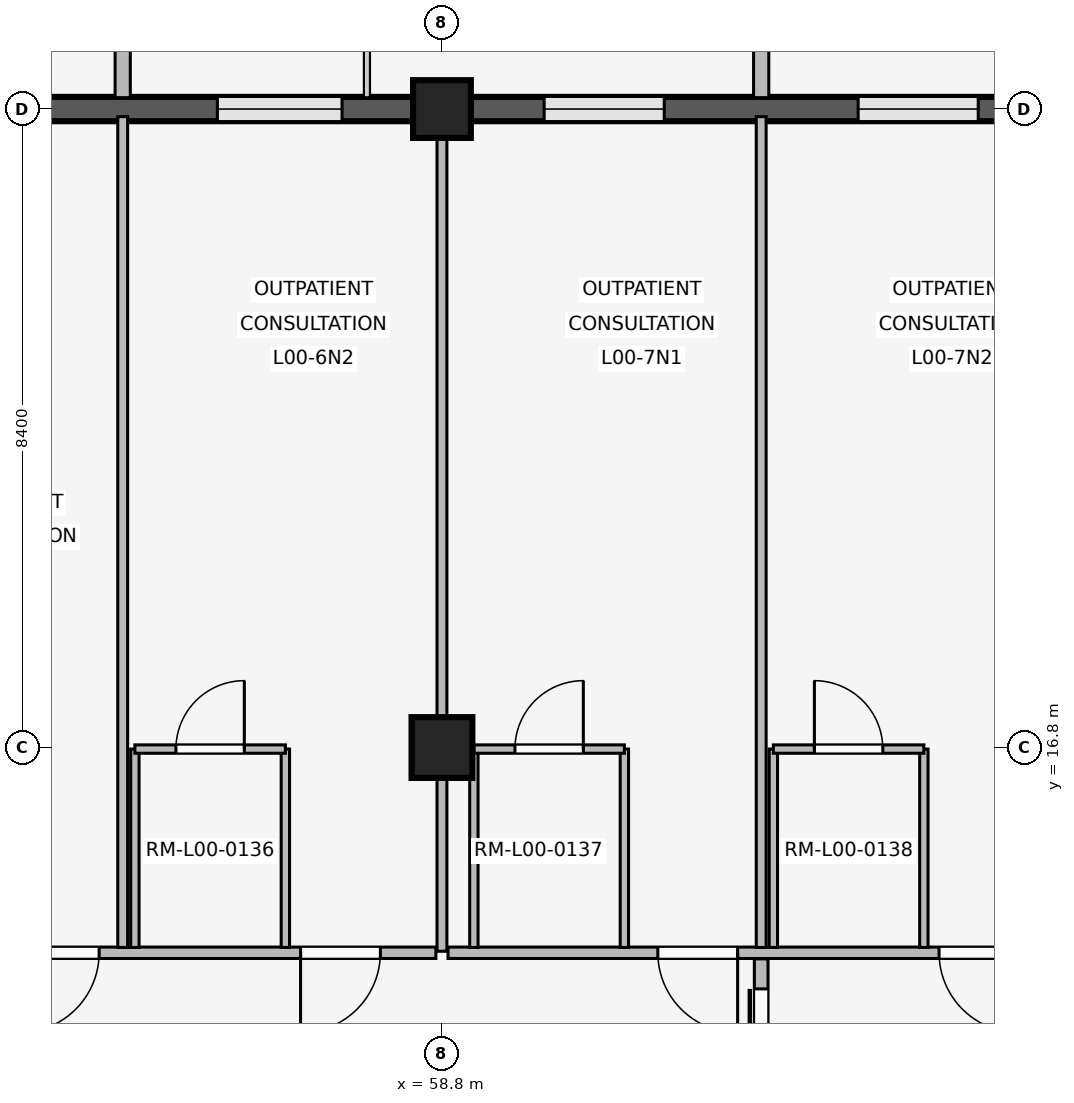
"""IFC4 building model, lengths in metres.
Left out: names, types, materials, properties, quantities, classifications, styles, units other than length and angle.
Written with IfcOpenShell. Run it as: python <this file> out.ifc"""

import sys

from ifc_helpers import new_model, si_unit, direction, frame, frame_2d, origin, origin_2d, place, context, subcontext, project, spatial, rectangle, extrude, element, fill, save


model = new_model("IFC4")
c1 = context("Model", 3, precision=1e-05, world=origin(), true_north=direction((0.0, 1.0)))
c2 = subcontext(c1, "Body", "Model", "MODEL_VIEW")
j1 = project(units=[si_unit("LENGTHUNIT", "METRE"), si_unit("PLANEANGLEUNIT", "RADIAN")], contexts=[c1])
p1 = place(None, origin())
s1 = spatial("IfcSite", under=j1, at=p1, CompositionType="ELEMENT")
p2 = place(p1, origin())
s2 = spatial("IfcBuilding", under=s1, at=p2, CompositionType="ELEMENT")
p3 = place(p2, origin())
s3 = spatial("IfcBuildingStorey", under=s2, at=p3, CompositionType="ELEMENT", Elevation=0.0)
p4 = place(p3, frame((58.8, 16.8, 0.0), z_axis=(0.0, 0.0, 1.0), x_axis=(1.0, 0.0, 0.0)))
e1 = element("IfcColumn", 1, at=p4, inside=s3, PredefinedType="COLUMN", context=c2, shape_type="SweptSolid", body=[
    extrude(rectangle(XDim=0.8, YDim=0.8, at=origin_2d()), origin(), (0.0, 0.0, 1.0), 4.8),
])
p5 = place(p3, frame((58.8, 25.2, 0.0), z_axis=(0.0, 0.0, 1.0), x_axis=(1.0, 0.0, 0.0)))
e2 = element("IfcColumn", 2, at=p5, inside=s3, PredefinedType="COLUMN", context=c2, shape_type="SweptSolid", body=[
    extrude(rectangle(XDim=0.76, YDim=0.76, at=origin_2d()), origin(), (0.0, 0.0, 1.0), 4.8),
])
p6 = place(p3, frame((50.775, 25.2, 0.0), z_axis=(0.0, 0.0, 1.0), x_axis=(1.0, 0.0, 0.0)))
e3 = element("IfcWall", 3, at=p6, inside=s3, PredefinedType="SOLIDWALL", context=c2, shape_type="SweptSolid", body=[
    extrude(rectangle(XDim=7.65, YDim=0.32, at=frame_2d((3.825, 0.0))), origin(), (0.0, 0.0, 1.0), 3.82),
])
p7 = place(p6, frame((0.939, 0.0, 0.85)))
e4 = element("IfcOpeningElement", 4, at=p7, cuts=e3, PredefinedType="OPENING", context=c2, shape_type="SweptSolid", body=[
    extrude(rectangle(XDim=1.64, YDim=1.75, at=frame_2d((0.82, 0.875))), frame((0.0, 0.17, 0.0), z_axis=(0.0, -1.0, 0.0), x_axis=(1.0, 0.0, 0.0)), (0.0, 0.0, 1.0), 0.34),
])
p8 = place(p6, frame((5.071, 0.0, 0.85)))
e5 = element("IfcOpeningElement", 5, at=p8, cuts=e3, PredefinedType="OPENING", context=c2, shape_type="SweptSolid", body=[
    extrude(rectangle(XDim=1.64, YDim=1.75, at=frame_2d((0.82, 0.875))), frame((0.0, 0.17, 0.0), z_axis=(0.0, -1.0, 0.0), x_axis=(1.0, 0.0, 0.0)), (0.0, 0.0, 1.0), 0.34),
])
p9 = place(p3, frame((54.6, 25.35, 0.0), z_axis=(0.0, 0.0, 1.0), x_axis=(0.0, 1.0, 0.0)))
e6 = element("IfcWall", 6, at=p9, inside=s3, PredefinedType="ELEMENTEDWALL", context=c2, shape_type="SweptSolid", body=[
    extrude(rectangle(XDim=0.85, YDim=0.2, at=frame_2d((0.425, 0.0))), origin(), (0.0, 0.0, 1.0), 3.8),
])
p10 = place(p3, frame((59.175, 25.2, 0.0), z_axis=(0.0, 0.0, 1.0), x_axis=(1.0, 0.0, 0.0)))
e7 = element("IfcWall", 7, at=p10, inside=s3, PredefinedType="SOLIDWALL", context=c2, shape_type="SweptSolid", body=[
    extrude(rectangle(XDim=7.65, YDim=0.32, at=frame_2d((3.825, 0.0))), origin(), (0.0, 0.0, 1.0), 3.82),
])
p11 = place(p10, frame((0.969, 0.0, 0.85)))
e8 = element("IfcOpeningElement", 8, at=p11, cuts=e7, PredefinedType="OPENING", context=c2, shape_type="SweptSolid", body=[
    extrude(rectangle(XDim=1.58, YDim=1.7, at=frame_2d((0.79, 0.85))), frame((0.0, 0.17, 0.0), z_axis=(0.0, -1.0, 0.0), x_axis=(1.0, 0.0, 0.0)), (0.0, 0.0, 1.0), 0.34),
])
p12 = place(p10, frame((5.101, 0.0, 0.85)))
e9 = element("IfcOpeningElement", 9, at=p12, cuts=e7, PredefinedType="OPENING", context=c2, shape_type="SweptSolid", body=[
    extrude(rectangle(XDim=1.58, YDim=1.7, at=frame_2d((0.79, 0.85))), frame((0.0, 0.17, 0.0), z_axis=(0.0, -1.0, 0.0), x_axis=(1.0, 0.0, 0.0)), (0.0, 0.0, 1.0), 0.34),
])
p13 = place(p3, frame((63.0, 25.35, 0.0), z_axis=(0.0, 0.0, 1.0), x_axis=(0.0, 1.0, 0.0)))
e10 = element("IfcWall", 10, at=p13, inside=s3, PredefinedType="ELEMENTEDWALL", context=c2, shape_type="SweptSolid", body=[
    extrude(rectangle(XDim=0.85, YDim=0.2, at=frame_2d((0.425, 0.0))), origin(), (0.0, 0.0, 1.0), 3.8),
])
p14 = place(p3, frame((58.72, 14.1, 0.0), z_axis=(0.0, 0.0, 1.0), x_axis=(-1.0, 0.0, 0.0)))
e11 = element("IfcWall", 11, at=p14, inside=s3, PredefinedType="PARTITIONING", context=c2, shape_type="SweptSolid", body=[
    extrude(rectangle(XDim=7.96, YDim=0.15, at=frame_2d((3.98, 0.0))), origin(), (0.0, 0.0, 1.0), 3.8),
])
p15 = place(p14, frame((0.73, 0.0, 0.0)))
e12 = element("IfcOpeningElement", 12, at=p15, cuts=e11, PredefinedType="OPENING", context=c2, shape_type="SweptSolid", body=[
    extrude(rectangle(XDim=1.05, YDim=2.2, at=frame_2d((0.525, 1.1))), frame((0.0, 0.085, 0.0), z_axis=(0.0, -1.0, 0.0), x_axis=(1.0, 0.0, 0.0)), (0.0, 0.0, 1.0), 0.17),
])
p16 = place(p14, frame((4.43, 0.0, 0.0)))
e13 = element("IfcOpeningElement", 13, at=p16, cuts=e11, PredefinedType="OPENING", context=c2, shape_type="SweptSolid", body=[
    extrude(rectangle(XDim=1.05, YDim=2.2, at=frame_2d((0.525, 1.1))), frame((0.0, 0.085, 0.0), z_axis=(0.0, -1.0, 0.0), x_axis=(1.0, 0.0, 0.0)), (0.0, 0.0, 1.0), 0.17),
])
p17 = place(p3, frame((54.6, 14.17, 0.0), z_axis=(0.0, 0.0, 1.0), x_axis=(0.0, 1.0, 0.0)))
e14 = element("IfcWall", 14, at=p17, inside=s3, PredefinedType="PARTITIONING", context=c2, shape_type="SweptSolid", body=[
    extrude(rectangle(XDim=10.93, YDim=0.13, at=frame_2d((5.465, 0.0))), origin(), (0.0, 0.0, 1.0), 3.8),
])
for number, where, z_axis, x_axis in (
    (15, (54.76, 14.17, 0.0), (0.0, 0.0, 1.0), (0.0, 1.0, 0.0)),
    (16, (56.74, 14.17, 0.0), (0.0, 0.0, 1.0), (0.0, 1.0, 0.0)),
):
    element("IfcWall", number, at=place(p3, frame(where, z_axis=z_axis, x_axis=x_axis)), inside=s3, PredefinedType="PARTITIONING", context=c2, shape_type="SweptSolid", body=[
        extrude(rectangle(XDim=2.61, YDim=0.11, at=frame_2d((1.305, 0.0))), origin(), (0.0, 0.0, 1.0), 3.8),
    ])
p18 = place(p3, frame((54.76, 16.78, 0.0), z_axis=(0.0, 0.0, 1.0), x_axis=(1.0, 0.0, 0.0)))
e17 = element("IfcWall", 17, at=p18, inside=s3, PredefinedType="PARTITIONING", context=c2, shape_type="SweptSolid", body=[
    extrude(rectangle(XDim=1.98, YDim=0.11, at=frame_2d((0.99, 0.0))), origin(), (0.0, 0.0, 1.0), 3.8),
])
p19 = place(p18, frame((0.54, 0.0, 0.0)))
e18 = element("IfcOpeningElement", 18, at=p19, cuts=e17, PredefinedType="OPENING", context=c2, shape_type="SweptSolid", body=[
    extrude(rectangle(XDim=0.9, YDim=2.1, at=frame_2d((0.45, 1.05))), frame((0.0, 0.065, 0.0), z_axis=(0.0, -1.0, 0.0), x_axis=(1.0, 0.0, 0.0)), (0.0, 0.0, 1.0), 0.13),
])
p20 = place(p3, frame((58.8, 14.12, 0.0), z_axis=(0.0, 0.0, 1.0), x_axis=(0.0, 1.0, 0.0)))
e19 = element("IfcWall", 19, at=p20, inside=s3, PredefinedType="PARTITIONING", context=c2, shape_type="SweptSolid", body=[
    extrude(rectangle(XDim=10.94, YDim=0.13, at=frame_2d((5.47, 0.0))), origin(), (0.0, 0.0, 1.0), 3.8),
])
p21 = place(p3, frame((67.12, 14.1, 0.0), z_axis=(0.0, 0.0, 1.0), x_axis=(-1.0, 0.0, 0.0)))
e20 = element("IfcWall", 20, at=p21, inside=s3, PredefinedType="PARTITIONING", context=c2, shape_type="SweptSolid", body=[
    extrude(rectangle(XDim=8.24, YDim=0.15, at=frame_2d((4.12, 0.0))), origin(), (0.0, 0.0, 1.0), 3.8),
])
p22 = place(p21, frame((0.73, 0.0, 0.0)))
e21 = element("IfcOpeningElement", 21, at=p22, cuts=e20, PredefinedType="OPENING", context=c2, shape_type="SweptSolid", body=[
    extrude(rectangle(XDim=1.05, YDim=2.2, at=frame_2d((0.525, 1.1))), frame((0.0, 0.085, 0.0), z_axis=(0.0, -1.0, 0.0), x_axis=(1.0, 0.0, 0.0)), (0.0, 0.0, 1.0), 0.17),
])
p23 = place(p21, frame((4.43, 0.0, 0.0)))
e22 = element("IfcOpeningElement", 22, at=p23, cuts=e20, PredefinedType="OPENING", context=c2, shape_type="SweptSolid", body=[
    extrude(rectangle(XDim=1.05, YDim=2.2, at=frame_2d((0.525, 1.1))), frame((0.0, 0.085, 0.0), z_axis=(0.0, -1.0, 0.0), x_axis=(1.0, 0.0, 0.0)), (0.0, 0.0, 1.0), 0.17),
])
p24 = place(p3, frame((63.0, 14.17, 0.0), z_axis=(0.0, 0.0, 1.0), x_axis=(0.0, 1.0, 0.0)))
e23 = element("IfcWall", 23, at=p24, inside=s3, PredefinedType="PARTITIONING", context=c2, shape_type="SweptSolid", body=[
    extrude(rectangle(XDim=10.93, YDim=0.13, at=frame_2d((5.465, 0.0))), origin(), (0.0, 0.0, 1.0), 3.8),
])
for number, where, z_axis, x_axis in (
    (24, (59.22, 14.17, 0.0), (0.0, 0.0, 1.0), (0.0, 1.0, 0.0)),
    (25, (61.2, 14.17, 0.0), (0.0, 0.0, 1.0), (0.0, 1.0, 0.0)),
):
    element("IfcWall", number, at=place(p3, frame(where, z_axis=z_axis, x_axis=x_axis)), inside=s3, PredefinedType="PARTITIONING", context=c2, shape_type="SweptSolid", body=[
        extrude(rectangle(XDim=2.61, YDim=0.11, at=frame_2d((1.305, 0.0))), origin(), (0.0, 0.0, 1.0), 3.8),
    ])
p25 = place(p3, frame((59.22, 16.78, 0.0), z_axis=(0.0, 0.0, 1.0), x_axis=(1.0, 0.0, 0.0)))
e26 = element("IfcWall", 26, at=p25, inside=s3, PredefinedType="PARTITIONING", context=c2, shape_type="SweptSolid", body=[
    extrude(rectangle(XDim=1.98, YDim=0.11, at=frame_2d((0.99, 0.0))), origin(), (0.0, 0.0, 1.0), 3.8),
])
p26 = place(p25, frame((0.54, 0.0, 0.0)))
e27 = element("IfcOpeningElement", 27, at=p26, cuts=e26, PredefinedType="OPENING", context=c2, shape_type="SweptSolid", body=[
    extrude(rectangle(XDim=0.9, YDim=2.1, at=frame_2d((0.45, 1.05))), frame((0.0, 0.065, 0.0), z_axis=(0.0, -1.0, 0.0), x_axis=(1.0, 0.0, 0.0)), (0.0, 0.0, 1.0), 0.13),
])
for number, where, z_axis, x_axis in (
    (28, (63.16, 14.17, 0.0), (0.0, 0.0, 1.0), (0.0, 1.0, 0.0)),
    (29, (65.14, 14.17, 0.0), (0.0, 0.0, 1.0), (0.0, 1.0, 0.0)),
):
    element("IfcWall", number, at=place(p3, frame(where, z_axis=z_axis, x_axis=x_axis)), inside=s3, PredefinedType="PARTITIONING", context=c2, shape_type="SweptSolid", body=[
        extrude(rectangle(XDim=2.61, YDim=0.11, at=frame_2d((1.305, 0.0))), origin(), (0.0, 0.0, 1.0), 3.8),
    ])
p27 = place(p3, frame((63.16, 16.78, 0.0), z_axis=(0.0, 0.0, 1.0), x_axis=(1.0, 0.0, 0.0)))
e30 = element("IfcWall", 30, at=p27, inside=s3, PredefinedType="PARTITIONING", context=c2, shape_type="SweptSolid", body=[
    extrude(rectangle(XDim=1.98, YDim=0.11, at=frame_2d((0.99, 0.0))), origin(), (0.0, 0.0, 1.0), 3.8),
])
p28 = place(p27, frame((0.54, 0.0, 0.0)))
e31 = element("IfcOpeningElement", 31, at=p28, cuts=e30, PredefinedType="OPENING", context=c2, shape_type="SweptSolid", body=[
    extrude(rectangle(XDim=0.9, YDim=2.1, at=frame_2d((0.45, 1.05))), frame((0.0, 0.065, 0.0), z_axis=(0.0, -1.0, 0.0), x_axis=(1.0, 0.0, 0.0)), (0.0, 0.0, 1.0), 0.13),
])
p29 = place(p3, frame((63.0, 11.18, 0.0), z_axis=(0.0, 0.0, 1.0), x_axis=(0.0, 1.0, 0.0)))
e32 = element("IfcWall", 32, at=p29, inside=s3, PredefinedType="PARTITIONING", context=c2, shape_type="SweptSolid", body=[
    extrude(rectangle(XDim=2.84, YDim=0.18, at=frame_2d((1.42, 0.0))), origin(), (0.0, 0.0, 1.0), 3.8),
])
p30 = place(p29, frame((0.395, 0.0, 0.0)))
e33 = element("IfcOpeningElement", 33, at=p30, cuts=e32, PredefinedType="OPENING", context=c2, shape_type="SweptSolid", body=[
    extrude(rectangle(XDim=2.05, YDim=2.35, at=frame_2d((1.025, 1.175))), frame((0.0, 0.1, 0.0), z_axis=(0.0, -1.0, 0.0), x_axis=(1.0, 0.0, 0.0)), (0.0, 0.0, 1.0), 0.2),
])
p31 = place(p8, origin())
e34 = element("IfcWindow", 34, at=p31, inside=s3, PartitioningType="SINGLE_PANEL", PredefinedType="WINDOW", context=c2, shape_type="SweptSolid", body=[
    extrude(rectangle(XDim=1.64, YDim=1.75, at=frame_2d((0.82, 0.875))), frame((0.0, 0.03, 0.0), z_axis=(0.0, -1.0, 0.0), x_axis=(1.0, 0.0, 0.0)), (0.0, 0.0, 1.0), 0.06),
])
fill(e5, e34)
p32 = place(p11, origin())
e35 = element("IfcWindow", 35, at=p32, inside=s3, PartitioningType="SINGLE_PANEL", PredefinedType="WINDOW", context=c2, shape_type="SweptSolid", body=[
    extrude(rectangle(XDim=1.58, YDim=1.7, at=frame_2d((0.79, 0.85))), frame((0.0, 0.03, 0.0), z_axis=(0.0, -1.0, 0.0), x_axis=(1.0, 0.0, 0.0)), (0.0, 0.0, 1.0), 0.06),
])
fill(e8, e35)
p33 = place(p12, origin())
e36 = element("IfcWindow", 36, at=p33, inside=s3, PartitioningType="SINGLE_PANEL", PredefinedType="WINDOW", context=c2, shape_type="SweptSolid", body=[
    extrude(rectangle(XDim=1.58, YDim=1.7, at=frame_2d((0.79, 0.85))), frame((0.0, 0.03, 0.0), z_axis=(0.0, -1.0, 0.0), x_axis=(1.0, 0.0, 0.0)), (0.0, 0.0, 1.0), 0.06),
])
fill(e9, e36)
p34 = place(p15, origin())
e37 = element("IfcDoor", 37, at=p34, inside=s3, OperationType="SINGLE_SWING_RIGHT", PredefinedType="DOOR", context=c2, shape_type="SweptSolid", body=[
    extrude(rectangle(XDim=1.05, YDim=2.2, at=frame_2d((0.525, 1.1))), frame((0.0, 0.025, 0.0), z_axis=(0.0, -1.0, 0.0), x_axis=(1.0, 0.0, 0.0)), (0.0, 0.0, 1.0), 0.05),
])
fill(e12, e37)
p35 = place(p16, origin())
e38 = element("IfcDoor", 38, at=p35, inside=s3, OperationType="SINGLE_SWING_RIGHT", PredefinedType="DOOR", context=c2, shape_type="SweptSolid", body=[
    extrude(rectangle(XDim=1.05, YDim=2.2, at=frame_2d((0.525, 1.1))), frame((0.0, 0.025, 0.0), z_axis=(0.0, -1.0, 0.0), x_axis=(1.0, 0.0, 0.0)), (0.0, 0.0, 1.0), 0.05),
])
fill(e13, e38)
p36 = place(p19, origin())
e39 = element("IfcDoor", 39, at=p36, inside=s3, OperationType="SINGLE_SWING_RIGHT", PredefinedType="DOOR", context=c2, shape_type="SweptSolid", body=[
    extrude(rectangle(XDim=0.9, YDim=2.1, at=frame_2d((0.45, 1.05))), frame((0.0, 0.025, 0.0), z_axis=(0.0, -1.0, 0.0), x_axis=(1.0, 0.0, 0.0)), (0.0, 0.0, 1.0), 0.05),
])
fill(e18, e39)
p37 = place(p22, origin())
e40 = element("IfcDoor", 40, at=p37, inside=s3, OperationType="SINGLE_SWING_LEFT", PredefinedType="DOOR", context=c2, shape_type="SweptSolid", body=[
    extrude(rectangle(XDim=1.05, YDim=2.2, at=frame_2d((0.525, 1.1))), frame((0.0, 0.025, 0.0), z_axis=(0.0, -1.0, 0.0), x_axis=(1.0, 0.0, 0.0)), (0.0, 0.0, 1.0), 0.05),
])
fill(e21, e40)
p38 = place(p23, origin())
e41 = element("IfcDoor", 41, at=p38, inside=s3, OperationType="SINGLE_SWING_LEFT", PredefinedType="DOOR", context=c2, shape_type="SweptSolid", body=[
    extrude(rectangle(XDim=1.05, YDim=2.2, at=frame_2d((0.525, 1.1))), frame((0.0, 0.025, 0.0), z_axis=(0.0, -1.0, 0.0), x_axis=(1.0, 0.0, 0.0)), (0.0, 0.0, 1.0), 0.05),
])
fill(e22, e41)
p39 = place(p26, origin())
e42 = element("IfcDoor", 42, at=p39, inside=s3, OperationType="SINGLE_SWING_RIGHT", PredefinedType="DOOR", context=c2, shape_type="SweptSolid", body=[
    extrude(rectangle(XDim=0.9, YDim=2.1, at=frame_2d((0.45, 1.05))), frame((0.0, 0.025, 0.0), z_axis=(0.0, -1.0, 0.0), x_axis=(1.0, 0.0, 0.0)), (0.0, 0.0, 1.0), 0.05),
])
fill(e27, e42)
p40 = place(p28, origin())
e43 = element("IfcDoor", 43, at=p40, inside=s3, OperationType="SINGLE_SWING_LEFT", PredefinedType="DOOR", context=c2, shape_type="SweptSolid", body=[
    extrude(rectangle(XDim=0.9, YDim=2.1, at=frame_2d((0.45, 1.05))), frame((0.0, 0.025, 0.0), z_axis=(0.0, -1.0, 0.0), x_axis=(1.0, 0.0, 0.0)), (0.0, 0.0, 1.0), 0.05),
])
fill(e31, e43)
p41 = place(p30, origin())
e44 = element("IfcDoor", 44, at=p41, inside=s3, OperationType="SLIDING_TO_LEFT", PredefinedType="DOOR", context=c2, shape_type="SweptSolid", body=[
    extrude(rectangle(XDim=2.05, YDim=2.35, at=frame_2d((1.025, 1.175))), frame((0.0, 0.025, 0.0), z_axis=(0.0, -1.0, 0.0), x_axis=(1.0, 0.0, 0.0)), (0.0, 0.0, 1.0), 0.05),
])
fill(e33, e44)
save(model, sys.argv[1])
